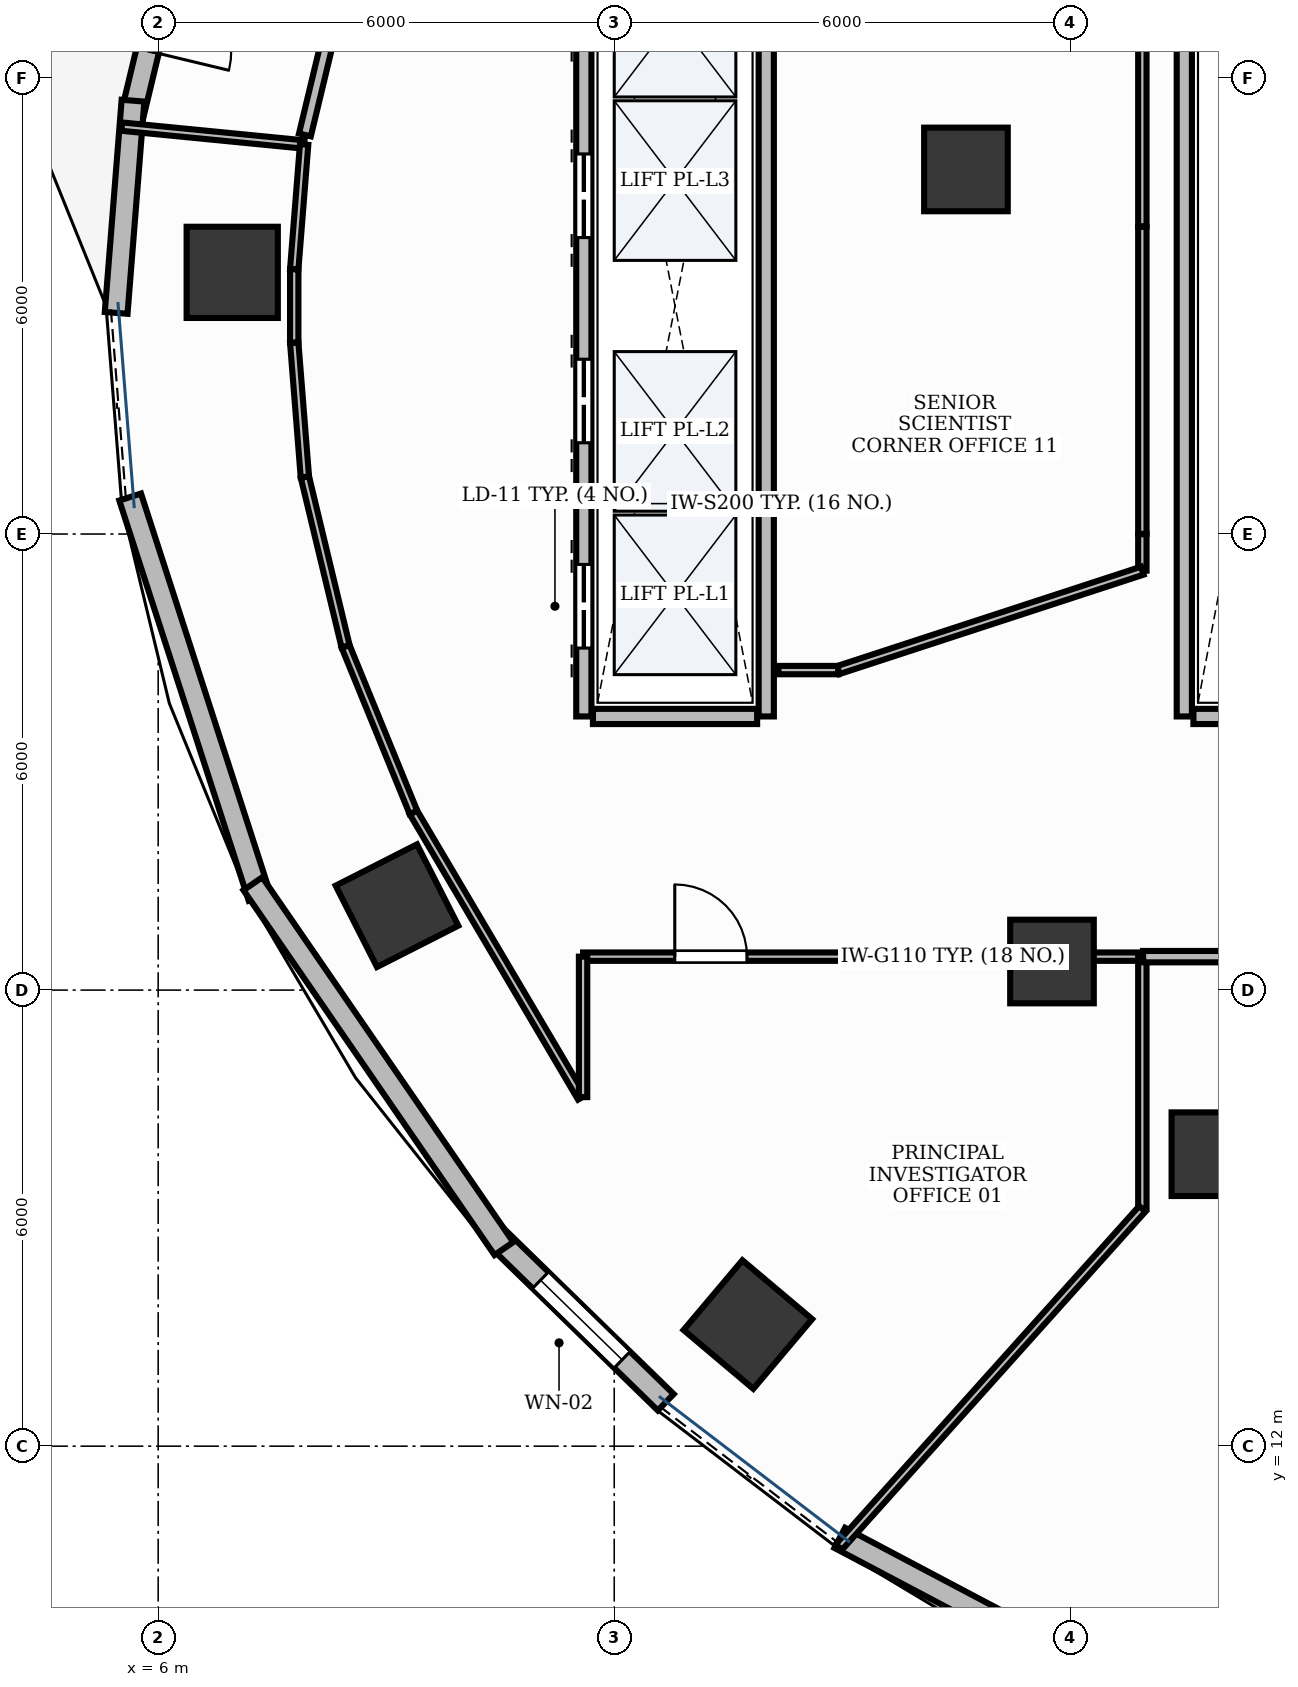
"""IFC4 building model, lengths in metres.
Left out: names, types, materials, properties, quantities, classifications, styles, units other than length and angle.
Written with IfcOpenShell. Run it as: python <this file> out.ifc"""

import sys

from ifc_helpers import new_model, si_unit, direction, frame, frame_2d, origin, origin_2d, place, context, subcontext, project, spatial, rectangle, extrude, element, fill, save


model = new_model("IFC4")
c1 = context("Model", 3, precision=1e-05, world=origin(), true_north=direction((0.0, 1.0)))
c2 = subcontext(c1, "Body", "Model", "MODEL_VIEW")
j1 = project(units=[si_unit("LENGTHUNIT", "METRE"), si_unit("PLANEANGLEUNIT", "RADIAN")], contexts=[c1])
p1 = place(None, origin())
s1 = spatial("IfcSite", under=j1, at=p1, CompositionType="ELEMENT")
p2 = place(p1, origin())
s2 = spatial("IfcBuilding", under=s1, at=p2, CompositionType="ELEMENT")
p3 = place(p2, frame((0.0, 0.0, 94.2)))
s3 = spatial("IfcBuildingStorey", under=s2, at=p3, CompositionType="ELEMENT", Elevation=94.2)
p4 = place(p3, frame((6.974, 27.442, -0.0), z_axis=(0.0, 0.0, 1.0), x_axis=(0.0, 1.0, 0.0)))
e1 = element("IfcColumn", 1, at=p4, inside=s3, PredefinedType="COLUMN", context=c2, shape_type="SweptSolid", body=[
    extrude(rectangle(XDim=1.2, YDim=1.2, at=origin_2d()), origin(), (0.0, 0.0, 1.0), 3.901),
])
p5 = place(p3, frame((16.627, 28.797, -0.0), z_axis=(0.0, 0.0, 1.0), x_axis=(1.0, 0.0, 0.0)))
e2 = element("IfcColumn", 2, at=p5, inside=s3, PredefinedType="COLUMN", context=c2, shape_type="SweptSolid", body=[
    extrude(rectangle(XDim=1.1, YDim=1.1, at=origin_2d()), origin(), (0.0, 0.0, 1.0), 3.901),
])
p6 = place(p3, frame((9.142, 19.111, -0.0), z_axis=(0.0, 0.0, 1.0), x_axis=(-0.453057191132, 0.891481453292, 0.0)))
e3 = element("IfcColumn", 3, at=p6, inside=s3, PredefinedType="COLUMN", context=c2, shape_type="SweptSolid", body=[
    extrude(rectangle(XDim=1.2, YDim=1.2, at=origin_2d()), origin(), (0.0, 0.0, 1.0), 3.901),
])
p7 = place(p3, frame((17.759, 18.376, -0.0), z_axis=(0.0, 0.0, 1.0), x_axis=(1.0, 0.0, 0.0)))
e4 = element("IfcColumn", 4, at=p7, inside=s3, PredefinedType="COLUMN", context=c2, shape_type="SweptSolid", body=[
    extrude(rectangle(XDim=1.1, YDim=1.1, at=origin_2d()), origin(), (0.0, 0.0, 1.0), 3.901),
])
p8 = place(p3, frame((13.758, 13.6, -0.0), z_axis=(0.0, 0.0, 1.0), x_axis=(-0.764246456939, 0.644924300253, 0.0)))
e5 = element("IfcColumn", 5, at=p8, inside=s3, PredefinedType="COLUMN", context=c2, shape_type="SweptSolid", body=[
    extrude(rectangle(XDim=1.2, YDim=1.2, at=origin_2d()), origin(), (0.0, 0.0, 1.0), 3.901),
])
p9 = place(p3, frame((19.883, 15.841, -0.0), z_axis=(0.0, 0.0, 1.0), x_axis=(1.0, 0.0, 0.0)))
e6 = element("IfcColumn", 6, at=p9, inside=s3, PredefinedType="COLUMN", context=c2, shape_type="SweptSolid", body=[
    extrude(rectangle(XDim=1.1, YDim=1.1, at=origin_2d()), origin(), (0.0, 0.0, 1.0), 3.901),
])
p10 = place(p3, frame((20.615, 9.431, -0.0), z_axis=(0.0, 0.0, 1.0), x_axis=(-0.930225540858, 0.366988341962, 0.0)))
e7 = element("IfcColumn", 7, at=p10, inside=s3, PredefinedType="COLUMN", context=c2, shape_type="SweptSolid", body=[
    extrude(rectangle(XDim=1.2, YDim=1.2, at=origin_2d()), origin(), (0.0, 0.0, 1.0), 3.901),
])
p11 = place(p3, frame((6.316, 32.248, 0.0), z_axis=(0.0, 0.0, 1.0), x_axis=(-0.233687533313, -0.972311748759, 0.0)))
e8 = element("IfcWall", 8, at=p11, inside=s3, PredefinedType="STANDARD", context=c2, shape_type="SweptSolid", body=[
    extrude(rectangle(XDim=2.788, YDim=0.3, at=frame_2d((1.394, 0.0))), origin(), (0.0, 0.0, 1.0), 3.9),
])
p12 = place(p11, frame((0.844, 0.0, 0.0)))
e9 = element("IfcOpeningElement", 9, at=p12, cuts=e8, PredefinedType="OPENING", context=c2, shape_type="SweptSolid", body=[
    extrude(rectangle(XDim=1.1, YDim=2.15, at=frame_2d((0.55, 1.075))), frame((0.0, 0.165, 0.0), z_axis=(0.0, -1.0, 0.0), x_axis=(1.0, 0.0, 0.0)), (0.0, 0.0, 1.0), 0.33),
])
p13 = place(p3, frame((10.456, 14.743, 0.0), z_axis=(0.0, 0.0, 1.0), x_axis=(0.716099460419, -0.697998254144, 0.0)))
e10 = element("IfcWall", 10, at=p13, inside=s3, PredefinedType="STANDARD", context=c2, shape_type="SweptSolid", body=[
    extrude(rectangle(XDim=3.102, YDim=0.3, at=frame_2d((1.551, 0.0))), origin(), (0.0, 0.0, 1.0), 3.47),
])
p14 = place(p13, frame((0.801, 0.0, 0.95)))
e11 = element("IfcOpeningElement", 11, at=p14, cuts=e10, PredefinedType="OPENING", context=c2, shape_type="SweptSolid", body=[
    extrude(rectangle(XDim=1.5, YDim=1.8, at=frame_2d((0.75, 0.9))), frame((0.0, 0.165, 0.0), z_axis=(0.0, -1.0, 0.0), x_axis=(1.0, 0.0, 0.0)), (0.0, 0.0, 1.0), 0.33),
])
p15 = place(p3, frame((5.669, 29.701, 0.0), z_axis=(0.0, 0.0, 1.0), x_axis=(-0.079062676622, -0.996869647028, 0.0)))
e12 = element("IfcWall", 12, at=p15, inside=s3, PredefinedType="STANDARD", context=c2, shape_type="SweptSolid", body=[
    extrude(rectangle(XDim=2.801, YDim=0.3, at=frame_2d((1.4, 0.0))), origin(), (0.0, 0.0, 1.0), 3.9),
])
p16 = place(p3, frame((5.632, 24.487, 0.0), z_axis=(0.0, 0.0, 1.0), x_axis=(0.307599470659, -0.951515930319, 0.0)))
e13 = element("IfcWall", 13, at=p16, inside=s3, PredefinedType="STANDARD", context=c2, shape_type="SweptSolid", body=[
    extrude(rectangle(XDim=5.534, YDim=0.3, at=frame_2d((2.767, 0.0))), origin(), (0.0, 0.0, 1.0), 3.9),
])
p17 = place(p3, frame((7.246, 19.399, 0.0), z_axis=(0.0, 0.0, 1.0), x_axis=(0.566825798999, -0.823837674296, 0.0)))
e14 = element("IfcWall", 14, at=p17, inside=s3, PredefinedType="STANDARD", context=c2, shape_type="SweptSolid", body=[
    extrude(rectangle(XDim=5.826, YDim=0.3, at=frame_2d((2.913, 0.0))), origin(), (0.0, 0.0, 1.0), 3.47),
])
p18 = place(p3, frame((14.967, 10.794, 0.0), z_axis=(0.0, 0.0, 1.0), x_axis=(0.883986649445, -0.467512142734, 0.0)))
e15 = element("IfcWall", 15, at=p18, inside=s3, PredefinedType="STANDARD", context=c2, shape_type="SweptSolid", body=[
    extrude(rectangle(XDim=6.601, YDim=0.3, at=frame_2d((3.301, 0.0))), origin(), (0.0, 0.0, 1.0), 3.9),
])
p19 = place(p3, frame((11.6, 21.6, 0.0), z_axis=(0.0, 0.0, 1.0), x_axis=(0.0, 1.0, 0.0)))
e16 = element("IfcWall", 16, at=p19, inside=s3, PredefinedType="PARTITIONING", context=c2, shape_type="SweptSolid", body=[
    extrude(rectangle(XDim=10.8, YDim=0.2, at=frame_2d((5.4, 0.0))), origin(), (0.0, 0.0, 1.0), 2.91),
])
p20 = place(p19, frame((0.9, 0.0, 0.0)))
e17 = element("IfcOpeningElement", 17, at=p20, cuts=e16, PredefinedType="OPENING", context=c2, shape_type="SweptSolid", body=[
    extrude(rectangle(XDim=1.1, YDim=2.2, at=frame_2d((0.55, 1.1))), frame((0.0, 0.115, 0.0), z_axis=(0.0, -1.0, 0.0), x_axis=(1.0, 0.0, 0.0)), (0.0, 0.0, 1.0), 0.23),
])
p21 = place(p19, frame((3.6, 0.0, 0.0)))
e18 = element("IfcOpeningElement", 18, at=p21, cuts=e16, PredefinedType="OPENING", context=c2, shape_type="SweptSolid", body=[
    extrude(rectangle(XDim=1.1, YDim=2.2, at=frame_2d((0.55, 1.1))), frame((0.0, 0.115, 0.0), z_axis=(0.0, -1.0, 0.0), x_axis=(1.0, 0.0, 0.0)), (0.0, 0.0, 1.0), 0.23),
])
p22 = place(p19, frame((6.3, 0.0, 0.0)))
e19 = element("IfcOpeningElement", 19, at=p22, cuts=e16, PredefinedType="OPENING", context=c2, shape_type="SweptSolid", body=[
    extrude(rectangle(XDim=1.1, YDim=2.2, at=frame_2d((0.55, 1.1))), frame((0.0, 0.115, 0.0), z_axis=(0.0, -1.0, 0.0), x_axis=(1.0, 0.0, 0.0)), (0.0, 0.0, 1.0), 0.23),
])
p23 = place(p19, frame((9.0, 0.0, 0.0)))
e20 = element("IfcOpeningElement", 20, at=p23, cuts=e16, PredefinedType="OPENING", context=c2, shape_type="SweptSolid", body=[
    extrude(rectangle(XDim=1.1, YDim=2.2, at=frame_2d((0.55, 1.1))), frame((0.0, 0.115, 0.0), z_axis=(0.0, -1.0, 0.0), x_axis=(1.0, 0.0, 0.0)), (0.0, 0.0, 1.0), 0.23),
])
p24 = place(p3, frame((14.0, 21.6, 0.0), z_axis=(0.0, 0.0, 1.0), x_axis=(0.0, 1.0, 0.0)))
e21 = element("IfcWall", 21, at=p24, inside=s3, PredefinedType="PARTITIONING", context=c2, shape_type="SweptSolid", body=[
    extrude(rectangle(XDim=10.8, YDim=0.2, at=frame_2d((5.4, 0.0))), origin(), (0.0, 0.0, 1.0), 2.91),
])
p25 = place(p3, frame((11.72, 21.6, 0.0), z_axis=(0.0, 0.0, 1.0), x_axis=(1.0, 0.0, 0.0)))
e22 = element("IfcWall", 22, at=p25, inside=s3, PredefinedType="PARTITIONING", context=c2, shape_type="SweptSolid", body=[
    extrude(rectangle(XDim=2.16, YDim=0.2, at=frame_2d((1.08, 0.0))), origin(), (0.0, 0.0, 1.0), 2.91),
])
p26 = place(p3, frame((19.5, 21.6, 0.0), z_axis=(0.0, 0.0, 1.0), x_axis=(0.0, 1.0, 0.0)))
e23 = element("IfcWall", 23, at=p26, inside=s3, PredefinedType="PARTITIONING", context=c2, shape_type="SweptSolid", body=[
    extrude(rectangle(XDim=10.8, YDim=0.2, at=frame_2d((5.4, 0.0))), origin(), (0.0, 0.0, 1.0), 2.91),
])
p27 = place(p3, frame((19.62, 21.6, 0.0), z_axis=(0.0, 0.0, 1.0), x_axis=(1.0, 0.0, 0.0)))
e24 = element("IfcWall", 24, at=p27, inside=s3, PredefinedType="PARTITIONING", context=c2, shape_type="SweptSolid", body=[
    extrude(rectangle(XDim=2.11, YDim=0.2, at=frame_2d((1.055, 0.0))), origin(), (0.0, 0.0, 1.0), 2.91),
])
p28 = place(p3, frame((11.59, 18.44, 0.0), z_axis=(0.0, 0.0, 1.0), x_axis=(1.0, 0.0, 0.0)))
e25 = element("IfcWall", 25, at=p28, inside=s3, PredefinedType="MOVABLE", context=c2, shape_type="SweptSolid", body=[
    extrude(rectangle(XDim=7.358, YDim=0.11, at=frame_2d((3.679, 0.0))), origin(), (0.0, 0.0, 1.0), 2.91),
])
p29 = place(p28, frame((1.206, 0.0, 0.0)))
e26 = element("IfcOpeningElement", 26, at=p29, cuts=e25, PredefinedType="OPENING", context=c2, shape_type="SweptSolid", body=[
    extrude(rectangle(XDim=0.95, YDim=2.15, at=frame_2d((0.475, 1.075))), frame((0.0, 0.07, 0.0), z_axis=(0.0, -1.0, 0.0), x_axis=(1.0, 0.0, 0.0)), (0.0, 0.0, 1.0), 0.14),
])
p30 = place(p3, frame((5.521, 29.36, 0.0), z_axis=(0.0, 0.0, 1.0), x_axis=(0.99523083929, -0.097547816614, 0.0)))
e27 = element("IfcWall", 27, at=p30, inside=s3, PredefinedType="MOVABLE", context=c2, shape_type="SweptSolid", body=[
    extrude(rectangle(XDim=2.41, YDim=0.11, at=frame_2d((1.205, 0.0))), origin(), (0.0, 0.0, 1.0), 2.91),
])
p31 = place(p3, frame((7.92, 29.125, 0.0), z_axis=(0.0, 0.0, 1.0), x_axis=(-0.079067162534, -0.996869291236, 0.0)))
e28 = element("IfcWall", 28, at=p31, inside=s3, PredefinedType="MOVABLE", context=c2, shape_type="SweptSolid", body=[
    extrude(rectangle(XDim=1.646, YDim=0.11, at=frame_2d((0.823, 0.0))), origin(), (0.0, 0.0, 1.0), 2.91),
])
p32 = place(p3, frame((7.79, 27.483, 0.0), z_axis=(0.0, 0.0, 1.0), x_axis=(0.0, -1.0, 0.0)))
e29 = element("IfcWall", 29, at=p32, inside=s3, PredefinedType="MOVABLE", context=c2, shape_type="SweptSolid", body=[
    extrude(rectangle(XDim=0.966, YDim=0.11, at=frame_2d((0.483, 0.0))), origin(), (0.0, 0.0, 1.0), 2.91),
])
p33 = place(p3, frame((7.79, 26.516, 0.0), z_axis=(0.0, 0.0, 1.0), x_axis=(0.079131522864, -0.996864184375, 0.0)))
e30 = element("IfcWall", 30, at=p33, inside=s3, PredefinedType="MOVABLE", context=c2, shape_type="SweptSolid", body=[
    extrude(rectangle(XDim=1.771, YDim=0.11, at=frame_2d((0.885, 0.0))), origin(), (0.0, 0.0, 1.0), 2.91),
])
p34 = place(p3, frame((7.93, 24.749, 0.0), z_axis=(0.0, 0.0, 1.0), x_axis=(0.233675196412, -0.972314713754, 0.0)))
e31 = element("IfcWall", 31, at=p34, inside=s3, PredefinedType="MOVABLE", context=c2, shape_type="SweptSolid", body=[
    extrude(rectangle(XDim=2.291, YDim=0.11, at=frame_2d((1.146, 0.0))), origin(), (0.0, 0.0, 1.0), 2.91),
])
p35 = place(p3, frame((8.466, 22.52, 0.0), z_axis=(0.0, 0.0, 1.0), x_axis=(0.378306283753, -0.925680482495, 0.0)))
e32 = element("IfcWall", 32, at=p35, inside=s3, PredefinedType="MOVABLE", context=c2, shape_type="SweptSolid", body=[
    extrude(rectangle(XDim=2.358, YDim=0.11, at=frame_2d((1.179, 0.0))), origin(), (0.0, 0.0, 1.0), 2.91),
])
p36 = place(p3, frame((9.359, 20.336, 0.0), z_axis=(0.0, 0.0, 1.0), x_axis=(0.508164254342, -0.86126017591, 0.0)))
e33 = element("IfcWall", 33, at=p36, inside=s3, PredefinedType="MOVABLE", context=c2, shape_type="SweptSolid", body=[
    extrude(rectangle(XDim=4.353, YDim=0.11, at=frame_2d((2.177, 0.0))), origin(), (0.0, 0.0, 1.0), 2.91),
])
p37 = place(p3, frame((11.59, 16.592, 0.0), z_axis=(0.0, 0.0, 1.0), x_axis=(0.0, 1.0, 0.0)))
e34 = element("IfcWall", 34, at=p37, inside=s3, PredefinedType="MOVABLE", context=c2, shape_type="SweptSolid", body=[
    extrude(rectangle(XDim=1.848, YDim=0.11, at=frame_2d((0.924, 0.0))), origin(), (0.0, 0.0, 1.0), 2.91),
])
p38 = place(p3, frame((18.948, 18.44, 0.0), z_axis=(0.0, 0.0, 1.0), x_axis=(0.0, -1.0, 0.0)))
e35 = element("IfcWall", 35, at=p38, inside=s3, PredefinedType="MOVABLE", context=c2, shape_type="SweptSolid", body=[
    extrude(rectangle(XDim=3.317, YDim=0.11, at=frame_2d((1.659, 0.0))), origin(), (0.0, 0.0, 1.0), 2.91),
])
p39 = place(p3, frame((18.948, 15.123, 0.0), z_axis=(0.0, 0.0, 1.0), x_axis=(-0.667833771006, -0.744310455592, 0.0)))
e36 = element("IfcWall", 36, at=p39, inside=s3, PredefinedType="MOVABLE", context=c2, shape_type="SweptSolid", body=[
    extrude(rectangle(XDim=5.979, YDim=0.11, at=frame_2d((2.99, 0.0))), origin(), (0.0, 0.0, 1.0), 2.91),
])
p40 = place(p3, frame((18.958, 18.44, 0.0), z_axis=(0.0, 0.0, 1.0), x_axis=(1.0, 0.0, 0.0)))
e37 = element("IfcWall", 37, at=p40, inside=s3, PredefinedType="PARTITIONING", context=c2, shape_type="SweptSolid", body=[
    extrude(rectangle(XDim=2.832, YDim=0.15, at=frame_2d((1.416, 0.0))), origin(), (0.0, 0.0, 1.0), 2.91),
])
p41 = place(p3, frame((8.466, 31.479, 0.0), z_axis=(0.0, 0.0, 1.0), x_axis=(-0.233675196412, -0.972314713754, 0.0)))
e38 = element("IfcWall", 38, at=p41, inside=s3, PredefinedType="PARTITIONING", context=c2, shape_type="SweptSolid", body=[
    extrude(rectangle(XDim=2.291, YDim=0.16, at=frame_2d((1.146, 0.0))), origin(), (0.0, 0.0, 1.0), 2.91),
])
p42 = place(p3, frame((18.948, 31.522, 0.0), z_axis=(0.0, 0.0, 1.0), x_axis=(0.0, -1.0, 0.0)))
e39 = element("IfcWall", 39, at=p42, inside=s3, PredefinedType="MOVABLE", context=c2, shape_type="SweptSolid", body=[
    extrude(rectangle(XDim=3.475, YDim=0.11, at=frame_2d((1.738, 0.0))), origin(), (0.0, 0.0, 1.0), 2.91),
])
p43 = place(p3, frame((18.948, 28.043, 0.0), z_axis=(0.0, 0.0, 1.0), x_axis=(0.0, -1.0, 0.0)))
e40 = element("IfcWall", 40, at=p43, inside=s3, PredefinedType="MOVABLE", context=c2, shape_type="SweptSolid", body=[
    extrude(rectangle(XDim=4.041, YDim=0.11, at=frame_2d((2.021, 0.0))), origin(), (0.0, 0.0, 1.0), 2.91),
])
p44 = place(p3, frame((18.948, 23.998, 0.0), z_axis=(0.0, 0.0, 1.0), x_axis=(0.0, -1.0, 0.0)))
e41 = element("IfcWall", 41, at=p44, inside=s3, PredefinedType="MOVABLE", context=c2, shape_type="SweptSolid", body=[
    extrude(rectangle(XDim=0.48, YDim=0.11, at=frame_2d((0.24, 0.0))), origin(), (0.0, 0.0, 1.0), 2.91),
])
p45 = place(p3, frame((18.948, 23.518, 0.0), z_axis=(0.0, 0.0, 1.0), x_axis=(-0.950522660163, -0.31065523095, 0.0)))
e42 = element("IfcWall", 42, at=p45, inside=s3, PredefinedType="MOVABLE", context=c2, shape_type="SweptSolid", body=[
    extrude(rectangle(XDim=4.21, YDim=0.11, at=frame_2d((2.105, 0.0))), origin(), (0.0, 0.0, 1.0), 2.91),
])
p46 = place(p3, frame((14.946, 22.21, 0.0), z_axis=(0.0, 0.0, 1.0), x_axis=(-1.0, 0.0, 0.0)))
e43 = element("IfcWall", 43, at=p46, inside=s3, PredefinedType="MOVABLE", context=c2, shape_type="SweptSolid", body=[
    extrude(rectangle(XDim=0.786, YDim=0.11, at=frame_2d((0.393, 0.0))), origin(), (0.0, 0.0, 1.0), 2.91),
])
p47 = place(p14, origin())
e44 = element("IfcWindow", 44, at=p47, inside=s3, PartitioningType="DOUBLE_PANEL_VERTICAL", PredefinedType="WINDOW", context=c2, shape_type="SweptSolid", body=[
    extrude(rectangle(XDim=1.5, YDim=1.8, at=frame_2d((0.75, 0.9))), frame((0.0, 0.03, 0.0), z_axis=(0.0, -1.0, 0.0), x_axis=(1.0, 0.0, 0.0)), (0.0, 0.0, 1.0), 0.06),
])
fill(e11, e44)
p48 = place(p20, origin())
e45 = element("IfcDoor", 45, at=p48, inside=s3, OperationType="DOUBLE_DOOR_SLIDING", PredefinedType="DOOR", context=c2, shape_type="SweptSolid", body=[
    extrude(rectangle(XDim=1.1, YDim=2.2, at=frame_2d((0.55, 1.1))), frame((0.0, 0.025, 0.0), z_axis=(0.0, -1.0, 0.0), x_axis=(1.0, 0.0, 0.0)), (0.0, 0.0, 1.0), 0.05),
])
fill(e17, e45)
p49 = place(p21, origin())
e46 = element("IfcDoor", 46, at=p49, inside=s3, OperationType="DOUBLE_DOOR_SLIDING", PredefinedType="DOOR", context=c2, shape_type="SweptSolid", body=[
    extrude(rectangle(XDim=1.1, YDim=2.2, at=frame_2d((0.55, 1.1))), frame((0.0, 0.025, 0.0), z_axis=(0.0, -1.0, 0.0), x_axis=(1.0, 0.0, 0.0)), (0.0, 0.0, 1.0), 0.05),
])
fill(e18, e46)
p50 = place(p22, origin())
e47 = element("IfcDoor", 47, at=p50, inside=s3, OperationType="DOUBLE_DOOR_SLIDING", PredefinedType="DOOR", context=c2, shape_type="SweptSolid", body=[
    extrude(rectangle(XDim=1.1, YDim=2.2, at=frame_2d((0.55, 1.1))), frame((0.0, 0.025, 0.0), z_axis=(0.0, -1.0, 0.0), x_axis=(1.0, 0.0, 0.0)), (0.0, 0.0, 1.0), 0.05),
])
fill(e19, e47)
p51 = place(p29, origin())
e48 = element("IfcDoor", 48, at=p51, inside=s3, OperationType="SINGLE_SWING_LEFT", PredefinedType="DOOR", context=c2, shape_type="SweptSolid", body=[
    extrude(rectangle(XDim=0.95, YDim=2.15, at=frame_2d((0.475, 1.075))), frame((0.0, 0.025, 0.0), z_axis=(0.0, -1.0, 0.0), x_axis=(1.0, 0.0, 0.0)), (0.0, 0.0, 1.0), 0.05),
])
fill(e26, e48)
save(model, sys.argv[1])
